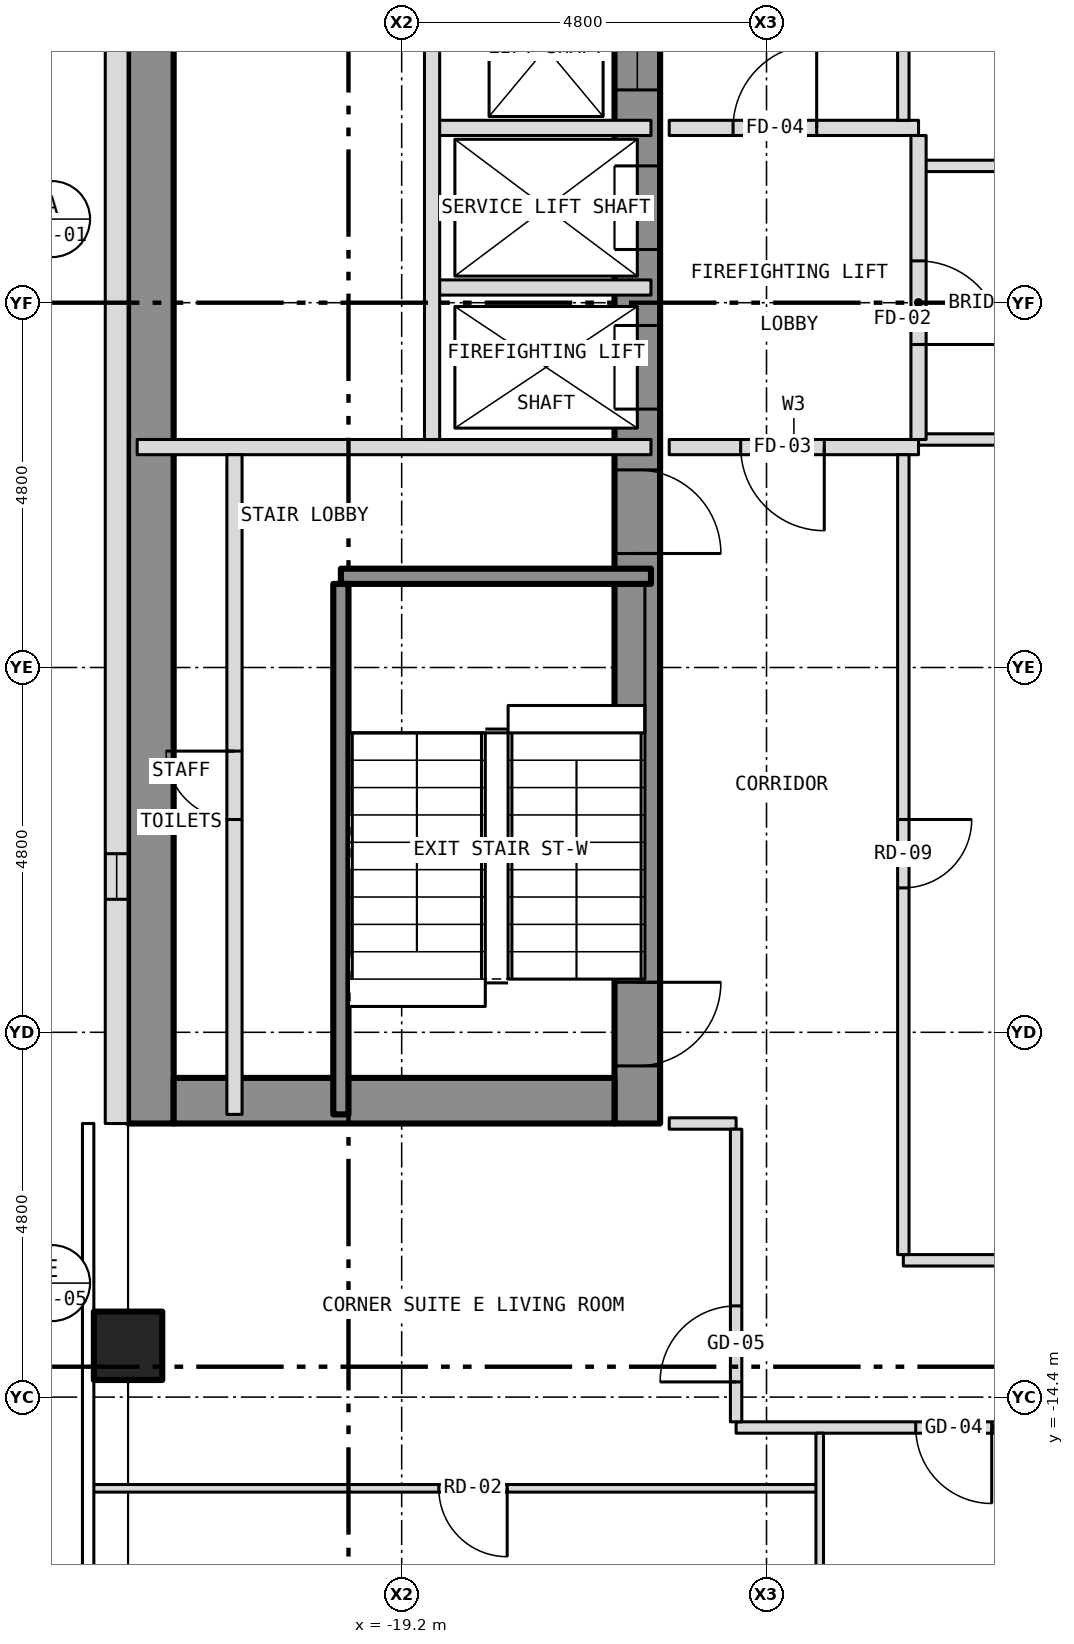
"""IFC4 building model, lengths in metres.
Left out: names, types, materials, properties, quantities, classifications, styles, units other than length and angle.
Written with IfcOpenShell. Run it as: python <this file> out.ifc"""

import sys

from ifc_helpers import new_model, si_unit, direction, frame, frame_2d, origin, origin_2d, place, context, subcontext, project, spatial, rectangle, hollow_rectangle, extrude, element, fill, save


model = new_model("IFC4")
c1 = context("Model", 3, precision=1e-05, world=origin(), true_north=direction((0.0, 1.0)))
c2 = subcontext(c1, "Body", "Model", "MODEL_VIEW")
j1 = project(units=[si_unit("LENGTHUNIT", "METRE"), si_unit("PLANEANGLEUNIT", "RADIAN")], contexts=[c1])
p1 = place(None, origin())
s1 = spatial("IfcSite", under=j1, at=p1, CompositionType="ELEMENT")
p2 = place(p1, origin())
s2 = spatial("IfcBuilding", under=s1, at=p2, CompositionType="ELEMENT")
p3 = place(p2, frame((0.0, 0.0, 124.0)))
s3 = spatial("IfcBuildingStorey", under=s2, at=p3, CompositionType="ELEMENT", Elevation=124.0)
p4 = place(p3, frame((-22.8, -13.725, -0.15), z_axis=(0.0, 0.0, 1.0), x_axis=(1.0, 0.0, 0.0)))
e1 = element("IfcColumn", 1, at=p4, inside=s3, PredefinedType="COLUMN", context=c2, shape_type="SweptSolid", body=[
    extrude(hollow_rectangle(XDim=0.9, YDim=0.9, WallThickness=0.05, at=origin_2d()), origin(), (0.0, 0.0, 1.0), 3.5),
])
p5 = place(p3, frame((-16.1, -10.8, 0.0), z_axis=(0.0, 0.0, 1.0), x_axis=(0.0, 1.0, 0.0)))
e2 = element("IfcWall", 2, at=p5, inside=s3, PredefinedType="SHEAR", context=c2, shape_type="SweptSolid", body=[
    extrude(rectangle(XDim=21.6, YDim=0.6, at=frame_2d((10.8, 0.0))), origin(), (0.0, 0.0, 1.0), 3.25),
])
p6 = place(p5, frame((9.4, 0.0, 0.0)))
e3 = element("IfcOpeningElement", 3, at=p6, cuts=e2, PredefinedType="OPENING", context=c2, shape_type="SweptSolid", body=[
    extrude(rectangle(XDim=1.1, YDim=2.1, at=frame_2d((0.55, 1.05))), frame((0.0, 0.312, 0.0), z_axis=(0.0, -1.0, 0.0), x_axis=(1.0, 0.0, 0.0)), (0.0, 0.0, 1.0), 0.624),
])
p7 = place(p5, frame((11.5, 0.0, 0.0)))
e4 = element("IfcOpeningElement", 4, at=p7, cuts=e2, PredefinedType="OPENING", context=c2, shape_type="SweptSolid", body=[
    extrude(rectangle(XDim=1.1, YDim=2.1, at=frame_2d((0.55, 1.05))), frame((0.0, 0.312, 0.0), z_axis=(0.0, -1.0, 0.0), x_axis=(1.0, 0.0, 0.0)), (0.0, 0.0, 1.0), 0.624),
])
p8 = place(p5, frame((13.6, 0.0, 0.0)))
e5 = element("IfcOpeningElement", 5, at=p8, cuts=e2, PredefinedType="OPENING", context=c2, shape_type="SweptSolid", body=[
    extrude(rectangle(XDim=1.1, YDim=2.1, at=frame_2d((0.55, 1.05))), frame((0.0, 0.312, 0.0), z_axis=(0.0, -1.0, 0.0), x_axis=(1.0, 0.0, 0.0)), (0.0, 0.0, 1.0), 0.624),
])
p9 = place(p5, frame((15.7, 0.0, 0.0)))
e6 = element("IfcOpeningElement", 6, at=p9, cuts=e2, PredefinedType="OPENING", context=c2, shape_type="SweptSolid", body=[
    extrude(rectangle(XDim=1.1, YDim=2.1, at=frame_2d((0.55, 1.05))), frame((0.0, 0.312, 0.0), z_axis=(0.0, -1.0, 0.0), x_axis=(1.0, 0.0, 0.0)), (0.0, 0.0, 1.0), 0.624),
])
p10 = place(p5, frame((17.8, 0.0, 0.0)))
e7 = element("IfcOpeningElement", 7, at=p10, cuts=e2, PredefinedType="OPENING", context=c2, shape_type="SweptSolid", body=[
    extrude(rectangle(XDim=1.1, YDim=2.1, at=frame_2d((0.55, 1.05))), frame((0.0, 0.312, 0.0), z_axis=(0.0, -1.0, 0.0), x_axis=(1.0, 0.0, 0.0)), (0.0, 0.0, 1.0), 0.624),
])
p11 = place(p5, frame((0.758, 0.0, 0.0)))
e8 = element("IfcOpeningElement", 8, at=p11, cuts=e2, PredefinedType="OPENING", context=c2, shape_type="SweptSolid", body=[
    extrude(rectangle(XDim=1.1, YDim=2.1, at=frame_2d((0.55, 1.05))), frame((0.0, 0.312, 0.0), z_axis=(0.0, -1.0, 0.0), x_axis=(1.0, 0.0, 0.0)), (0.0, 0.0, 1.0), 0.624),
])
p12 = place(p5, frame((7.5, 0.0, 0.0)))
e9 = element("IfcOpeningElement", 9, at=p12, cuts=e2, PredefinedType="OPENING", context=c2, shape_type="SweptSolid", body=[
    extrude(rectangle(XDim=1.1, YDim=2.1, at=frame_2d((0.55, 1.05))), frame((0.0, 0.312, 0.0), z_axis=(0.0, -1.0, 0.0), x_axis=(1.0, 0.0, 0.0)), (0.0, 0.0, 1.0), 0.624),
])
p13 = place(p3, frame((-22.5, -10.8, 0.0), z_axis=(0.0, 0.0, 1.0), x_axis=(0.0, 1.0, 0.0)))
e10 = element("IfcWall", 10, at=p13, inside=s3, PredefinedType="SHEAR", context=c2, shape_type="SweptSolid", body=[
    extrude(rectangle(XDim=21.6, YDim=0.6, at=frame_2d((10.8, 0.0))), origin(), (0.0, 0.0, 1.0), 3.25),
])
p14 = place(p3, frame((-22.2, -10.5, 0.0), z_axis=(0.0, 0.0, 1.0), x_axis=(1.0, 0.0, 0.0)))
e11 = element("IfcWall", 11, at=p14, inside=s3, PredefinedType="SHEAR", context=c2, shape_type="SweptSolid", body=[
    extrude(rectangle(XDim=5.8, YDim=0.6, at=frame_2d((2.9, 0.0))), origin(), (0.0, 0.0, 1.0), 3.25),
])
p15 = place(p3, frame((-22.95, 10.8, 0.0), z_axis=(0.0, 0.0, 1.0), x_axis=(0.0, -1.0, 0.0)))
e12 = element("IfcWall", 12, at=p15, inside=s3, PredefinedType="SOLIDWALL", context=c2, shape_type="SweptSolid", body=[
    extrude(rectangle(XDim=21.6, YDim=0.3, at=frame_2d((10.8, 0.0))), origin(), (0.0, 0.0, 1.0), 3.5),
])
p16 = place(p15, frame((18.05, 0.0, 1.0)))
e13 = element("IfcOpeningElement", 13, at=p16, cuts=e12, PredefinedType="OPENING", context=c2, shape_type="SweptSolid", body=[
    extrude(rectangle(XDim=0.6, YDim=1.5, at=frame_2d((0.3, 0.75))), frame((0.0, 0.162, 0.0), z_axis=(0.0, -1.0, 0.0), x_axis=(1.0, 0.0, 0.0)), (0.0, 0.0, 1.0), 0.324),
])
p17 = place(p3, frame((-23.28, -15.6, 0.0), z_axis=(0.0, 0.0, 1.0), x_axis=(1.0, 0.0, 0.0)))
e14 = element("IfcWall", 14, at=p17, inside=s3, PredefinedType="PARTITIONING", context=c2, shape_type="SweptSolid", body=[
    extrude(rectangle(XDim=9.58, YDim=0.1, at=frame_2d((4.79, 0.0))), origin(), (0.0, 0.0, 1.0), 3.35),
])
p18 = place(p17, frame((4.568, 0.0, 0.0)))
e15 = element("IfcOpeningElement", 15, at=p18, cuts=e14, PredefinedType="OPENING", context=c2, shape_type="SweptSolid", body=[
    extrude(rectangle(XDim=0.9, YDim=2.1, at=frame_2d((0.45, 1.05))), frame((0.0, 0.062, 0.0), z_axis=(0.0, -1.0, 0.0), x_axis=(1.0, 0.0, 0.0)), (0.0, 0.0, 1.0), 0.124),
])
p19 = place(p3, frame((-14.8, -14.8, 0.0), z_axis=(0.0, 0.0, 1.0), x_axis=(1.0, 0.0, 0.0)))
e16 = element("IfcWall", 16, at=p19, inside=s3, PredefinedType="PARTITIONING", context=c2, shape_type="SweptSolid", body=[
    extrude(rectangle(XDim=6.85, YDim=0.15, at=frame_2d((3.425, 0.0))), origin(), (0.0, 0.0, 1.0), 3.35),
])
p20 = place(p19, frame((2.363, 0.0, 0.0)))
e17 = element("IfcOpeningElement", 17, at=p20, cuts=e16, PredefinedType="OPENING", context=c2, shape_type="SweptSolid", body=[
    extrude(rectangle(XDim=1.0, YDim=2.1, at=frame_2d((0.5, 1.05))), frame((0.0, 0.087, 0.0), z_axis=(0.0, -1.0, 0.0), x_axis=(1.0, 0.0, 0.0)), (0.0, 0.0, 1.0), 0.174),
])
p21 = place(p3, frame((-12.6, -12.6, 0.0), z_axis=(0.0, 0.0, 1.0), x_axis=(1.0, 0.0, 0.0)))
e18 = element("IfcWall", 18, at=p21, inside=s3, PredefinedType="PARTITIONING", context=c2, shape_type="SweptSolid", body=[
    extrude(rectangle(XDim=4.68, YDim=0.15, at=frame_2d((2.34, 0.0))), origin(), (0.0, 0.0, 1.0), 3.35),
])
p22 = place(p3, frame((-15.68, -10.8, 0.0), z_axis=(0.0, 0.0, 1.0), x_axis=(1.0, 0.0, 0.0)))
e19 = element("IfcWall", 19, at=p22, inside=s3, PredefinedType="PARTITIONING", context=c2, shape_type="SweptSolid", body=[
    extrude(rectangle(XDim=0.88, YDim=0.15, at=frame_2d((0.44, 0.0))), origin(), (0.0, 0.0, 1.0), 3.35),
])
p23 = place(p3, frame((-20.0, -3.6, 0.0), z_axis=(0.0, 0.0, 1.0), x_axis=(1.0, 0.0, 0.0)))
e20 = element("IfcWall", 20, at=p23, inside=s3, PredefinedType="SHEAR", context=c2, shape_type="SweptSolid", body=[
    extrude(rectangle(XDim=4.08, YDim=0.2, at=frame_2d((2.04, 0.0))), origin(), (0.0, 0.0, 1.0), 3.25),
])
p24 = place(p3, frame((-22.68, -1.9, 0.0), z_axis=(0.0, 0.0, 1.0), x_axis=(1.0, 0.0, 0.0)))
e21 = element("IfcWall", 21, at=p24, inside=s3, PredefinedType="PARTITIONING", context=c2, shape_type="SweptSolid", body=[
    extrude(rectangle(XDim=6.76, YDim=0.2, at=frame_2d((3.38, 0.0))), origin(), (0.0, 0.0, 1.0), 3.25),
])
p25 = place(p3, frame((-15.68, -1.9, 0.0), z_axis=(0.0, 0.0, 1.0), x_axis=(1.0, 0.0, 0.0)))
e22 = element("IfcWall", 22, at=p25, inside=s3, PredefinedType="PARTITIONING", context=c2, shape_type="SweptSolid", body=[
    extrude(rectangle(XDim=3.28, YDim=0.2, at=frame_2d((1.64, 0.0))), origin(), (0.0, 0.0, 1.0), 3.35),
])
p26 = place(p25, frame((0.94, 0.0, 0.0)))
e23 = element("IfcOpeningElement", 23, at=p26, cuts=e22, PredefinedType="OPENING", context=c2, shape_type="SweptSolid", body=[
    extrude(rectangle(XDim=1.1, YDim=2.1, at=frame_2d((0.55, 1.05))), frame((0.0, 0.112, 0.0), z_axis=(0.0, -1.0, 0.0), x_axis=(1.0, 0.0, 0.0)), (0.0, 0.0, 1.0), 0.224),
])
p27 = place(p3, frame((-12.4, -1.8, 0.0), z_axis=(0.0, 0.0, 1.0), x_axis=(1.0, 0.0, 0.0)))
e24 = element("IfcWall", 24, at=p27, inside=s3, PredefinedType="PARTITIONING", context=c2, shape_type="SweptSolid", body=[
    extrude(rectangle(XDim=4.48, YDim=0.15, at=frame_2d((2.24, 0.0))), origin(), (0.0, 0.0, 1.0), 3.35),
])
p28 = place(p3, frame((-18.8, 0.2, 0.0), z_axis=(0.0, 0.0, 1.0), x_axis=(1.0, 0.0, 0.0)))
e25 = element("IfcWall", 25, at=p28, inside=s3, PredefinedType="PARTITIONING", context=c2, shape_type="SweptSolid", body=[
    extrude(rectangle(XDim=2.88, YDim=0.2, at=frame_2d((1.44, 0.0))), origin(), (0.0, 0.0, 1.0), 3.25),
])
p29 = place(p3, frame((-12.4, 1.8, 0.0), z_axis=(0.0, 0.0, 1.0), x_axis=(1.0, 0.0, 0.0)))
e26 = element("IfcWall", 26, at=p29, inside=s3, PredefinedType="PARTITIONING", context=c2, shape_type="SweptSolid", body=[
    extrude(rectangle(XDim=4.48, YDim=0.15, at=frame_2d((2.24, 0.0))), origin(), (0.0, 0.0, 1.0), 3.35),
])
p30 = place(p3, frame((-18.8, 2.3, 0.0), z_axis=(0.0, 0.0, 1.0), x_axis=(1.0, 0.0, 0.0)))
e27 = element("IfcWall", 27, at=p30, inside=s3, PredefinedType="PARTITIONING", context=c2, shape_type="SweptSolid", body=[
    extrude(rectangle(XDim=2.88, YDim=0.2, at=frame_2d((1.44, 0.0))), origin(), (0.0, 0.0, 1.0), 3.25),
])
p31 = place(p3, frame((-15.68, 2.3, 0.0), z_axis=(0.0, 0.0, 1.0), x_axis=(1.0, 0.0, 0.0)))
e28 = element("IfcWall", 28, at=p31, inside=s3, PredefinedType="PARTITIONING", context=c2, shape_type="SweptSolid", body=[
    extrude(rectangle(XDim=3.28, YDim=0.2, at=frame_2d((1.64, 0.0))), origin(), (0.0, 0.0, 1.0), 3.35),
])
p32 = place(p31, frame((0.84, 0.0, 0.0)))
e29 = element("IfcOpeningElement", 29, at=p32, cuts=e28, PredefinedType="OPENING", context=c2, shape_type="SweptSolid", body=[
    extrude(rectangle(XDim=1.1, YDim=2.1, at=frame_2d((0.55, 1.05))), frame((0.0, 0.112, 0.0), z_axis=(0.0, -1.0, 0.0), x_axis=(1.0, 0.0, 0.0)), (0.0, 0.0, 1.0), 0.224),
])
p33 = place(p3, frame((-21.4, -10.68, 0.0), z_axis=(0.0, 0.0, 1.0), x_axis=(0.0, 1.0, 0.0)))
e30 = element("IfcWall", 30, at=p33, inside=s3, PredefinedType="PARTITIONING", context=c2, shape_type="SweptSolid", body=[
    extrude(rectangle(XDim=8.68, YDim=0.2, at=frame_2d((4.34, 0.0))), origin(), (0.0, 0.0, 1.0), 3.25),
])
p34 = place(p33, frame((3.88, 0.0, 0.0)))
e31 = element("IfcOpeningElement", 31, at=p34, cuts=e30, PredefinedType="OPENING", context=c2, shape_type="SweptSolid", body=[
    extrude(rectangle(XDim=0.9, YDim=2.1, at=frame_2d((0.45, 1.05))), frame((0.0, 0.112, 0.0), z_axis=(0.0, -1.0, 0.0), x_axis=(1.0, 0.0, 0.0)), (0.0, 0.0, 1.0), 0.224),
])
p35 = place(p3, frame((-20.0, -10.68, 0.0), z_axis=(0.0, 0.0, 1.0), x_axis=(0.0, 1.0, 0.0)))
e32 = element("IfcWall", 32, at=p35, inside=s3, PredefinedType="SHEAR", context=c2, shape_type="SweptSolid", body=[
    extrude(rectangle(XDim=6.98, YDim=0.2, at=frame_2d((3.49, 0.0))), origin(), (0.0, 0.0, 1.0), 3.25),
])
p36 = place(p3, frame((-18.8, -1.8, 0.0), z_axis=(0.0, 0.0, 1.0), x_axis=(0.0, 1.0, 0.0)))
e33 = element("IfcWall", 33, at=p36, inside=s3, PredefinedType="PARTITIONING", context=c2, shape_type="SweptSolid", body=[
    extrude(rectangle(XDim=12.48, YDim=0.2, at=frame_2d((6.24, 0.0))), origin(), (0.0, 0.0, 1.0), 3.25),
])
p37 = place(p3, frame((-14.8, -14.725, 0.0), z_axis=(0.0, 0.0, 1.0), x_axis=(0.0, 1.0, 0.0)))
e34 = element("IfcWall", 34, at=p37, inside=s3, PredefinedType="PARTITIONING", context=c2, shape_type="SweptSolid", body=[
    extrude(rectangle(XDim=3.85, YDim=0.15, at=frame_2d((1.925, 0.0))), origin(), (0.0, 0.0, 1.0), 3.35),
])
p38 = place(p37, frame((0.525, 0.0, 0.0)))
e35 = element("IfcOpeningElement", 35, at=p38, cuts=e34, PredefinedType="OPENING", context=c2, shape_type="SweptSolid", body=[
    extrude(rectangle(XDim=1.0, YDim=2.1, at=frame_2d((0.5, 1.05))), frame((0.0, 0.087, 0.0), z_axis=(0.0, -1.0, 0.0), x_axis=(1.0, 0.0, 0.0)), (0.0, 0.0, 1.0), 0.174),
])
p39 = place(p3, frame((-13.7, -22.68, 0.0), z_axis=(0.0, 0.0, 1.0), x_axis=(0.0, 1.0, 0.0)))
e36 = element("IfcWall", 36, at=p39, inside=s3, PredefinedType="PARTITIONING", context=c2, shape_type="SweptSolid", body=[
    extrude(rectangle(XDim=7.805, YDim=0.1, at=frame_2d((3.902, 0.0))), origin(), (0.0, 0.0, 1.0), 3.35),
])
p40 = place(p3, frame((-12.6, -12.525, 0.0), z_axis=(0.0, 0.0, 1.0), x_axis=(0.0, 1.0, 0.0)))
e37 = element("IfcWall", 37, at=p40, inside=s3, PredefinedType="PARTITIONING", context=c2, shape_type="SweptSolid", body=[
    extrude(rectangle(XDim=10.525, YDim=0.15, at=frame_2d((5.262, 0.0))), origin(), (0.0, 0.0, 1.0), 3.35),
])
p41 = place(p40, frame((4.825, 0.0, 0.0)))
e38 = element("IfcOpeningElement", 38, at=p41, cuts=e37, PredefinedType="OPENING", context=c2, shape_type="SweptSolid", body=[
    extrude(rectangle(XDim=0.9, YDim=2.1, at=frame_2d((0.45, 1.05))), frame((0.0, 0.087, 0.0), z_axis=(0.0, -1.0, 0.0), x_axis=(1.0, 0.0, 0.0)), (0.0, 0.0, 1.0), 0.174),
])
p42 = place(p3, frame((-12.6, 2.4, 0.0), z_axis=(0.0, 0.0, 1.0), x_axis=(0.0, 1.0, 0.0)))
e39 = element("IfcWall", 39, at=p42, inside=s3, PredefinedType="PARTITIONING", context=c2, shape_type="SweptSolid", body=[
    extrude(rectangle(XDim=3.425, YDim=0.15, at=frame_2d((1.712, 0.0))), origin(), (0.0, 0.0, 1.0), 3.35),
])
p43 = place(p3, frame((-12.4, -1.8, 0.0), z_axis=(0.0, 0.0, 1.0), x_axis=(0.0, 1.0, 0.0)))
e40 = element("IfcWall", 40, at=p43, inside=s3, PredefinedType="PARTITIONING", context=c2, shape_type="SweptSolid", body=[
    extrude(rectangle(XDim=4.0, YDim=0.2, at=frame_2d((2.0, 0.0))), origin(), (0.0, 0.0, 1.0), 3.35),
])
p44 = place(p43, frame((1.25, 0.0, 0.0)))
e41 = element("IfcOpeningElement", 41, at=p44, cuts=e40, PredefinedType="OPENING", context=c2, shape_type="SweptSolid", body=[
    extrude(rectangle(XDim=1.1, YDim=2.1, at=frame_2d((0.55, 1.05))), frame((0.0, 0.112, 0.0), z_axis=(0.0, -1.0, 0.0), x_axis=(1.0, 0.0, 0.0)), (0.0, 0.0, 1.0), 0.224),
])
p45 = place(p16, origin())
e42 = element("IfcWindow", 42, at=p45, inside=s3, PartitioningType="SINGLE_PANEL", PredefinedType="WINDOW", context=c2, shape_type="SweptSolid", body=[
    extrude(rectangle(XDim=0.6, YDim=1.5, at=frame_2d((0.3, 0.75))), frame((0.0, -0.06, 0.0), z_axis=(0.0, -1.0, 0.0), x_axis=(1.0, 0.0, 0.0)), (0.0, 0.0, 1.0), 0.06),
])
fill(e13, e42)
p46 = place(p6, origin())
e43 = element("IfcDoor", 43, at=p46, inside=s3, OperationType="SLIDING_TO_LEFT", PredefinedType="DOOR", context=c2, shape_type="SweptSolid", body=[
    extrude(rectangle(XDim=1.1, YDim=2.1, at=frame_2d((0.55, 1.05))), frame((0.0, 0.025, 0.0), z_axis=(0.0, -1.0, 0.0), x_axis=(1.0, 0.0, 0.0)), (0.0, 0.0, 1.0), 0.05),
])
fill(e3, e43)
p47 = place(p7, origin())
e44 = element("IfcDoor", 44, at=p47, inside=s3, OperationType="SLIDING_TO_LEFT", PredefinedType="DOOR", context=c2, shape_type="SweptSolid", body=[
    extrude(rectangle(XDim=1.1, YDim=2.1, at=frame_2d((0.55, 1.05))), frame((0.0, 0.025, 0.0), z_axis=(0.0, -1.0, 0.0), x_axis=(1.0, 0.0, 0.0)), (0.0, 0.0, 1.0), 0.05),
])
fill(e4, e44)
p48 = place(p8, origin())
e45 = element("IfcDoor", 45, at=p48, inside=s3, OperationType="SLIDING_TO_LEFT", PredefinedType="DOOR", context=c2, shape_type="SweptSolid", body=[
    extrude(rectangle(XDim=1.1, YDim=2.1, at=frame_2d((0.55, 1.05))), frame((0.0, 0.025, 0.0), z_axis=(0.0, -1.0, 0.0), x_axis=(1.0, 0.0, 0.0)), (0.0, 0.0, 1.0), 0.05),
])
fill(e5, e45)
p49 = place(p11, origin())
e46 = element("IfcDoor", 46, at=p49, inside=s3, OperationType="SINGLE_SWING_RIGHT", PredefinedType="DOOR", context=c2, shape_type="SweptSolid", body=[
    extrude(rectangle(XDim=1.1, YDim=2.1, at=frame_2d((0.55, 1.05))), frame((0.0, 0.025, 0.0), z_axis=(0.0, -1.0, 0.0), x_axis=(1.0, 0.0, 0.0)), (0.0, 0.0, 1.0), 0.05),
])
fill(e8, e46)
p50 = place(p12, origin())
e47 = element("IfcDoor", 47, at=p50, inside=s3, OperationType="SINGLE_SWING_LEFT", PredefinedType="DOOR", context=c2, shape_type="SweptSolid", body=[
    extrude(rectangle(XDim=1.1, YDim=2.1, at=frame_2d((0.55, 1.05))), frame((0.0, 0.025, 0.0), z_axis=(0.0, -1.0, 0.0), x_axis=(1.0, 0.0, 0.0)), (0.0, 0.0, 1.0), 0.05),
])
fill(e9, e47)
p51 = place(p34, origin())
e48 = element("IfcDoor", 48, at=p51, inside=s3, OperationType="SINGLE_SWING_RIGHT", PredefinedType="DOOR", context=c2, shape_type="SweptSolid", body=[
    extrude(rectangle(XDim=0.9, YDim=2.1, at=frame_2d((0.45, 1.05))), frame((0.0, 0.025, 0.0), z_axis=(0.0, -1.0, 0.0), x_axis=(1.0, 0.0, 0.0)), (0.0, 0.0, 1.0), 0.05),
])
fill(e31, e48)
p52 = place(p44, origin())
e49 = element("IfcDoor", 49, at=p52, inside=s3, OperationType="SINGLE_SWING_LEFT", PredefinedType="DOOR", context=c2, shape_type="SweptSolid", body=[
    extrude(rectangle(XDim=1.1, YDim=2.1, at=frame_2d((0.55, 1.05))), frame((0.0, 0.025, 0.0), z_axis=(0.0, -1.0, 0.0), x_axis=(1.0, 0.0, 0.0)), (0.0, 0.0, 1.0), 0.05),
])
fill(e41, e49)
p53 = place(p26, origin())
e50 = element("IfcDoor", 50, at=p53, inside=s3, OperationType="SINGLE_SWING_RIGHT", PredefinedType="DOOR", context=c2, shape_type="SweptSolid", body=[
    extrude(rectangle(XDim=1.1, YDim=2.1, at=frame_2d((0.55, 1.05))), frame((0.0, 0.025, 0.0), z_axis=(0.0, -1.0, 0.0), x_axis=(1.0, 0.0, 0.0)), (0.0, 0.0, 1.0), 0.05),
])
fill(e23, e50)
p54 = place(p32, origin())
e51 = element("IfcDoor", 51, at=p54, inside=s3, OperationType="SINGLE_SWING_RIGHT", PredefinedType="DOOR", context=c2, shape_type="SweptSolid", body=[
    extrude(rectangle(XDim=1.1, YDim=2.1, at=frame_2d((0.55, 1.05))), frame((0.0, 0.025, 0.0), z_axis=(0.0, -1.0, 0.0), x_axis=(1.0, 0.0, 0.0)), (0.0, 0.0, 1.0), 0.05),
])
fill(e29, e51)
p55 = place(p20, origin())
e52 = element("IfcDoor", 52, at=p55, inside=s3, OperationType="SINGLE_SWING_RIGHT", PredefinedType="DOOR", context=c2, shape_type="SweptSolid", body=[
    extrude(rectangle(XDim=1.0, YDim=2.1, at=frame_2d((0.5, 1.05))), frame((0.0, 0.025, 0.0), z_axis=(0.0, -1.0, 0.0), x_axis=(1.0, 0.0, 0.0)), (0.0, 0.0, 1.0), 0.05),
])
fill(e17, e52)
p56 = place(p38, origin())
e53 = element("IfcDoor", 53, at=p56, inside=s3, OperationType="SINGLE_SWING_LEFT", PredefinedType="DOOR", context=c2, shape_type="SweptSolid", body=[
    extrude(rectangle(XDim=1.0, YDim=2.1, at=frame_2d((0.5, 1.05))), frame((0.0, 0.025, 0.0), z_axis=(0.0, -1.0, 0.0), x_axis=(1.0, 0.0, 0.0)), (0.0, 0.0, 1.0), 0.05),
])
fill(e35, e53)
p57 = place(p18, origin())
e54 = element("IfcDoor", 54, at=p57, inside=s3, OperationType="SINGLE_SWING_RIGHT", PredefinedType="DOOR", context=c2, shape_type="SweptSolid", body=[
    extrude(rectangle(XDim=0.9, YDim=2.1, at=frame_2d((0.45, 1.05))), frame((0.0, 0.025, 0.0), z_axis=(0.0, -1.0, 0.0), x_axis=(1.0, 0.0, 0.0)), (0.0, 0.0, 1.0), 0.05),
])
fill(e15, e54)
p58 = place(p41, origin())
e55 = element("IfcDoor", 55, at=p58, inside=s3, OperationType="SINGLE_SWING_RIGHT", PredefinedType="DOOR", context=c2, shape_type="SweptSolid", body=[
    extrude(rectangle(XDim=0.9, YDim=2.1, at=frame_2d((0.45, 1.05))), frame((0.0, 0.025, 0.0), z_axis=(0.0, -1.0, 0.0), x_axis=(1.0, 0.0, 0.0)), (0.0, 0.0, 1.0), 0.05),
])
fill(e38, e55)
save(model, sys.argv[1])
